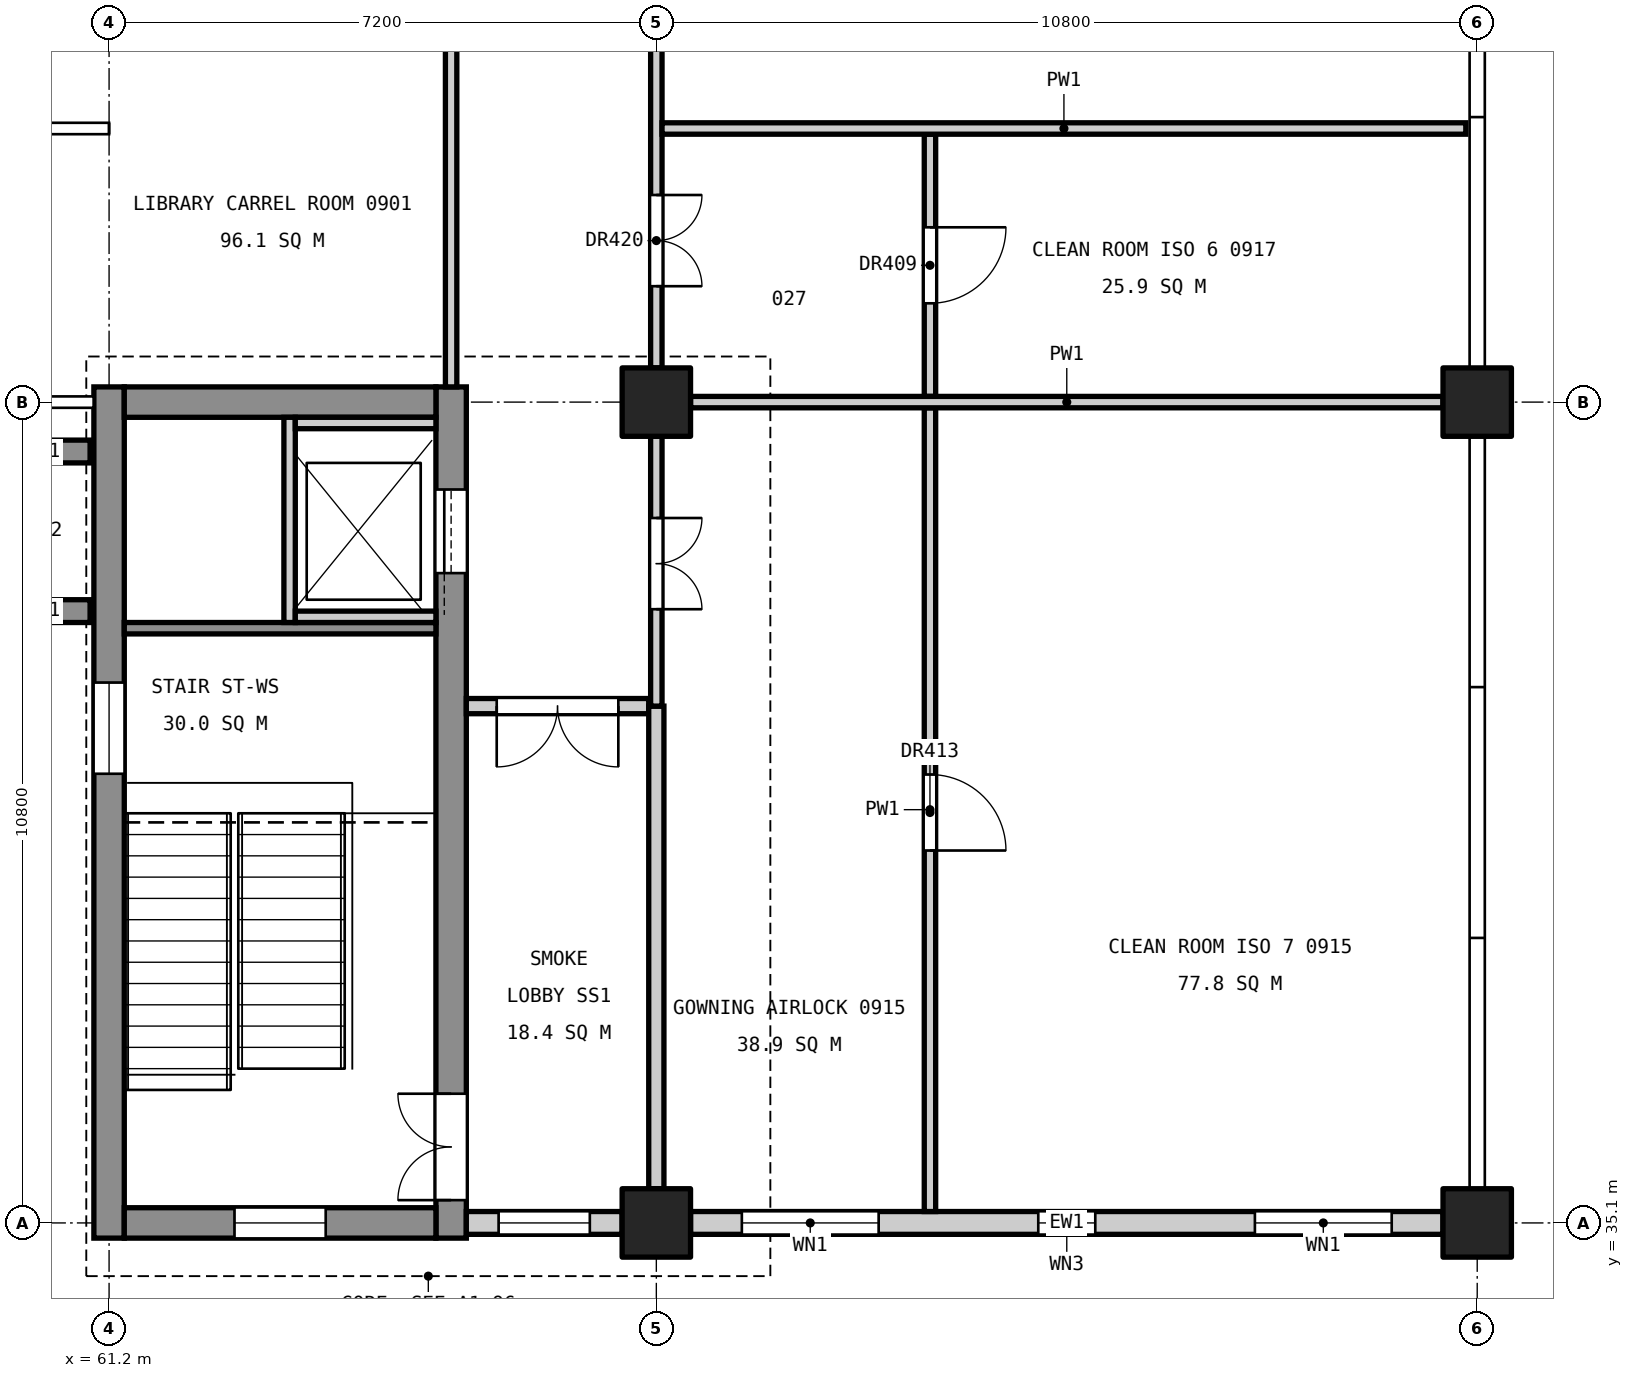
"""IFC4 building model, lengths in metres.
Left out: names, types, materials, properties, quantities, classifications, styles, units other than length and angle.
Written with IfcOpenShell. Run it as: python <this file> out.ifc"""

import sys

from ifc_helpers import new_model, si_unit, direction, frame, frame_2d, origin, origin_2d, place, context, subcontext, project, spatial, rectangle, extrude, element, fill, save


model = new_model("IFC4")
c1 = context("Model", 3, precision=1e-05, world=origin(), true_north=direction((0.0, 1.0)))
c2 = subcontext(c1, "Body", "Model", "MODEL_VIEW")
j1 = project(units=[si_unit("LENGTHUNIT", "METRE"), si_unit("PLANEANGLEUNIT", "RADIAN")], contexts=[c1])
p1 = place(None, origin())
s1 = spatial("IfcSite", under=j1, at=p1, CompositionType="ELEMENT")
p2 = place(p1, origin())
s2 = spatial("IfcBuilding", under=s1, at=p2, CompositionType="ELEMENT")
p3 = place(p2, frame((0.0, 0.0, 46.2)))
s3 = spatial("IfcBuildingStorey", under=s2, at=p3, CompositionType="ELEMENT", Elevation=46.2)
for number, where, z_axis, x_axis in (
    (1, (68.4, 35.1, 0.0), (0.0, 0.0, 1.0), (1.0, 0.0, 0.0)),
    (2, (68.4, 45.9, 0.0), (0.0, 0.0, 1.0), (1.0, 0.0, 0.0)),
    (3, (79.2, 35.1, 0.0), (0.0, 0.0, 1.0), (1.0, 0.0, 0.0)),
    (4, (79.2, 45.9, 0.0), (0.0, 0.0, 1.0), (1.0, 0.0, 0.0)),
):
    element("IfcColumn", number, at=place(p3, frame(where, z_axis=z_axis, x_axis=x_axis)), inside=s3, PredefinedType="COLUMN", context=c2, shape_type="SweptSolid", body=[
        extrude(rectangle(XDim=0.9, YDim=0.9, at=origin_2d()), origin(), (0.0, 0.0, 1.0), 4.8),
    ])
p4 = place(p3, frame((61.2, 34.9, 0.0), z_axis=(0.0, 0.0, 1.0), x_axis=(0.0, 1.0, 0.0)))
e5 = element("IfcWall", 5, at=p4, inside=s3, PredefinedType="SHEAR", context=c2, shape_type="SweptSolid", body=[
    extrude(rectangle(XDim=11.2, YDim=0.4, at=frame_2d((5.6, 0.0))), origin(), (0.0, 0.0, 1.0), 4.55),
])
p5 = place(p4, frame((6.11, 0.0, 3.4)))
e6 = element("IfcOpeningElement", 6, at=p5, cuts=e5, PredefinedType="OPENING", context=c2, shape_type="SweptSolid", body=[
    extrude(rectangle(XDim=1.2, YDim=0.9, at=frame_2d((0.6, 0.45))), frame((0.0, 0.21, 0.0), z_axis=(0.0, -1.0, 0.0), x_axis=(1.0, 0.0, 0.0)), (0.0, 0.0, 1.0), 0.42),
])
p6 = place(p3, frame((65.7, 34.9, 0.0), z_axis=(0.0, 0.0, 1.0), x_axis=(0.0, 1.0, 0.0)))
e7 = element("IfcWall", 7, at=p6, inside=s3, PredefinedType="SHEAR", context=c2, shape_type="SweptSolid", body=[
    extrude(rectangle(XDim=11.2, YDim=0.4, at=frame_2d((5.6, 0.0))), origin(), (0.0, 0.0, 1.0), 4.55),
])
p7 = place(p6, frame((0.5, 0.0, 0.0)))
e8 = element("IfcOpeningElement", 8, at=p7, cuts=e7, PredefinedType="OPENING", context=c2, shape_type="SweptSolid", body=[
    extrude(rectangle(XDim=1.4, YDim=2.1, at=frame_2d((0.7, 1.05))), frame((0.0, 0.21, 0.0), z_axis=(0.0, -1.0, 0.0), x_axis=(1.0, 0.0, 0.0)), (0.0, 0.0, 1.0), 0.42),
])
p8 = place(p6, frame((8.75, 0.0, 0.0)))
e9 = element("IfcOpeningElement", 9, at=p8, cuts=e7, PredefinedType="OPENING", context=c2, shape_type="SweptSolid", body=[
    extrude(rectangle(XDim=1.1, YDim=2.1, at=frame_2d((0.55, 1.05))), frame((0.0, 0.21, 0.0), z_axis=(0.0, -1.0, 0.0), x_axis=(1.0, 0.0, 0.0)), (0.0, 0.0, 1.0), 0.42),
])
p9 = place(p3, frame((61.4, 35.1, 0.0), z_axis=(0.0, 0.0, 1.0), x_axis=(1.0, 0.0, 0.0)))
e10 = element("IfcWall", 10, at=p9, inside=s3, PredefinedType="SHEAR", context=c2, shape_type="SweptSolid", body=[
    extrude(rectangle(XDim=4.1, YDim=0.4, at=frame_2d((2.05, 0.0))), origin(), (0.0, 0.0, 1.0), 4.55),
])
p10 = place(p9, frame((1.45, 0.0, 3.4)))
e11 = element("IfcOpeningElement", 11, at=p10, cuts=e10, PredefinedType="OPENING", context=c2, shape_type="SweptSolid", body=[
    extrude(rectangle(XDim=1.2, YDim=0.9, at=frame_2d((0.6, 0.45))), frame((0.0, 0.21, 0.0), z_axis=(0.0, -1.0, 0.0), x_axis=(1.0, 0.0, 0.0)), (0.0, 0.0, 1.0), 0.42),
])
p11 = place(p3, frame((61.4, 45.9, 0.0), z_axis=(0.0, 0.0, 1.0), x_axis=(1.0, 0.0, 0.0)))
e12 = element("IfcWall", 12, at=p11, inside=s3, PredefinedType="SHEAR", context=c2, shape_type="SweptSolid", body=[
    extrude(rectangle(XDim=4.1, YDim=0.4, at=frame_2d((2.05, 0.0))), origin(), (0.0, 0.0, 1.0), 4.55),
])
for number, where, z_axis, x_axis in (
    (13, (60.95, 43.15, 0.0), (0.0, 0.0, 1.0), (-1.0, 0.0, 0.0)),
    (14, (60.95, 45.25, 0.0), (0.0, 0.0, 1.0), (-1.0, 0.0, 0.0)),
):
    element("IfcWall", number, at=place(p3, frame(where, z_axis=z_axis, x_axis=x_axis)), inside=s3, PredefinedType="SHEAR", context=c2, shape_type="SweptSolid", body=[
        extrude(rectangle(XDim=1.25, YDim=0.3, at=frame_2d((0.625, 0.0))), origin(), (0.0, 0.0, 1.0), 4.8),
    ])
p12 = place(p3, frame((61.4, 42.925, 0.0), z_axis=(0.0, 0.0, 1.0), x_axis=(1.0, 0.0, 0.0)))
e15 = element("IfcWall", 15, at=p12, inside=s3, PredefinedType="SOLIDWALL", context=c2, shape_type="SweptSolid", body=[
    extrude(rectangle(XDim=4.1, YDim=0.15, at=frame_2d((2.05, 0.0))), origin(), (0.0, 0.0, 1.0), 4.55),
])
p13 = place(p3, frame((63.575, 43.0, 0.0), z_axis=(0.0, 0.0, 1.0), x_axis=(0.0, 1.0, 0.0)))
e16 = element("IfcWall", 16, at=p13, inside=s3, PredefinedType="SOLIDWALL", context=c2, shape_type="SweptSolid", body=[
    extrude(rectangle(XDim=2.7, YDim=0.15, at=frame_2d((1.35, 0.0))), origin(), (0.0, 0.0, 1.0), 4.8),
])
for number, where, z_axis, x_axis in (
    (17, (63.65, 43.075, 0.0), (0.0, 0.0, 1.0), (1.0, 0.0, 0.0)),
    (18, (63.65, 45.625, 0.0), (0.0, 0.0, 1.0), (1.0, 0.0, 0.0)),
):
    element("IfcWall", number, at=place(p3, frame(where, z_axis=z_axis, x_axis=x_axis)), inside=s3, PredefinedType="SOLIDWALL", context=c2, shape_type="SweptSolid", body=[
        extrude(rectangle(XDim=1.85, YDim=0.15, at=frame_2d((0.925, 0.0))), origin(), (0.0, 0.0, 1.0), 4.8),
    ])
p14 = place(p3, frame((65.9, 35.1, 0.0), z_axis=(0.0, 0.0, 1.0), x_axis=(1.0, 0.0, 0.0)))
e19 = element("IfcWall", 19, at=p14, inside=s3, PredefinedType="STANDARD", context=c2, shape_type="SweptSolid", body=[
    extrude(rectangle(XDim=2.05, YDim=0.3, at=frame_2d((1.025, 0.0))), origin(), (0.0, 0.0, 1.0), 3.85),
])
p15 = place(p14, frame((0.425, 0.0, 0.9)))
e20 = element("IfcOpeningElement", 20, at=p15, cuts=e19, PredefinedType="OPENING", context=c2, shape_type="SweptSolid", body=[
    extrude(rectangle(XDim=1.2, YDim=2.4, at=frame_2d((0.6, 1.2))), frame((0.0, 0.16, 0.0), z_axis=(0.0, -1.0, 0.0), x_axis=(1.0, 0.0, 0.0)), (0.0, 0.0, 1.0), 0.32),
])
p16 = place(p3, frame((68.85, 35.1, 0.0), z_axis=(0.0, 0.0, 1.0), x_axis=(1.0, 0.0, 0.0)))
e21 = element("IfcWall", 21, at=p16, inside=s3, PredefinedType="STANDARD", context=c2, shape_type="SweptSolid", body=[
    extrude(rectangle(XDim=9.9, YDim=0.3, at=frame_2d((4.95, 0.0))), origin(), (0.0, 0.0, 1.0), 3.85),
])
p17 = place(p16, frame((0.675, 0.0, 0.9)))
e22 = element("IfcOpeningElement", 22, at=p17, cuts=e21, PredefinedType="OPENING", context=c2, shape_type="SweptSolid", body=[
    extrude(rectangle(XDim=1.8, YDim=2.4, at=frame_2d((0.9, 1.2))), frame((0.0, 0.16, 0.0), z_axis=(0.0, -1.0, 0.0), x_axis=(1.0, 0.0, 0.0)), (0.0, 0.0, 1.0), 0.32),
])
p18 = place(p16, frame((4.575, 0.0, 0.8)))
e23 = element("IfcOpeningElement", 23, at=p18, cuts=e21, PredefinedType="OPENING", context=c2, shape_type="SweptSolid", body=[
    extrude(rectangle(XDim=0.75, YDim=1.2, at=frame_2d((0.375, 0.6))), frame((0.0, 0.16, 0.0), z_axis=(0.0, -1.0, 0.0), x_axis=(1.0, 0.0, 0.0)), (0.0, 0.0, 1.0), 0.32),
])
p19 = place(p16, frame((7.425, 0.0, 0.9)))
e24 = element("IfcOpeningElement", 24, at=p19, cuts=e21, PredefinedType="OPENING", context=c2, shape_type="SweptSolid", body=[
    extrude(rectangle(XDim=1.8, YDim=2.4, at=frame_2d((0.9, 1.2))), frame((0.0, 0.16, 0.0), z_axis=(0.0, -1.0, 0.0), x_axis=(1.0, 0.0, 0.0)), (0.0, 0.0, 1.0), 0.32),
])
p20 = place(p3, frame((65.7, 46.1, 0.0), z_axis=(0.0, 0.0, 1.0), x_axis=(0.0, 1.0, 0.0)))
e25 = element("IfcWall", 25, at=p20, inside=s3, PredefinedType="PARTITIONING", context=c2, shape_type="SweptSolid", body=[
    extrude(rectangle(XDim=10.45, YDim=0.15, at=frame_2d((5.225, 0.0))), origin(), (0.0, 0.0, 1.0), 3.55),
])
p21 = place(p20, frame((4.7, 0.0, 0.0)))
e26 = element("IfcOpeningElement", 26, at=p21, cuts=e25, PredefinedType="OPENING", context=c2, shape_type="SweptSolid", body=[
    extrude(rectangle(XDim=1.0, YDim=2.1, at=frame_2d((0.5, 1.05))), frame((0.0, 0.085, 0.0), z_axis=(0.0, -1.0, 0.0), x_axis=(1.0, 0.0, 0.0)), (0.0, 0.0, 1.0), 0.17),
])
p22 = place(p3, frame((65.9, 41.9, 0.0), z_axis=(0.0, 0.0, 1.0), x_axis=(1.0, 0.0, 0.0)))
e27 = element("IfcWall", 27, at=p22, inside=s3, PredefinedType="PARTITIONING", context=c2, shape_type="SweptSolid", body=[
    extrude(rectangle(XDim=2.4, YDim=0.2, at=frame_2d((1.2, 0.0))), origin(), (0.0, 0.0, 1.0), 3.55),
])
p23 = place(p22, frame((0.4, 0.0, 0.0)))
e28 = element("IfcOpeningElement", 28, at=p23, cuts=e27, PredefinedType="OPENING", context=c2, shape_type="SweptSolid", body=[
    extrude(rectangle(XDim=1.6, YDim=2.1, at=frame_2d((0.8, 1.05))), frame((0.0, 0.11, 0.0), z_axis=(0.0, -1.0, 0.0), x_axis=(1.0, 0.0, 0.0)), (0.0, 0.0, 1.0), 0.22),
])
p24 = place(p3, frame((68.4, 35.55, 0.0), z_axis=(0.0, 0.0, 1.0), x_axis=(0.0, 1.0, 0.0)))
e29 = element("IfcWall", 29, at=p24, inside=s3, PredefinedType="PARTITIONING", context=c2, shape_type="SweptSolid", body=[
    extrude(rectangle(XDim=6.35, YDim=0.2, at=frame_2d((3.175, 0.0))), origin(), (0.0, 0.0, 1.0), 3.55),
])
p25 = place(p3, frame((68.4, 41.9, 0.0), z_axis=(0.0, 0.0, 1.0), x_axis=(0.0, 1.0, 0.0)))
e30 = element("IfcWall", 30, at=p25, inside=s3, PredefinedType="PARTITIONING", context=c2, shape_type="SweptSolid", body=[
    extrude(rectangle(XDim=3.55, YDim=0.15, at=frame_2d((1.775, 0.0))), origin(), (0.0, 0.0, 1.0), 3.55),
])
p26 = place(p25, frame((1.275, 0.0, 0.0)))
e31 = element("IfcOpeningElement", 31, at=p26, cuts=e30, PredefinedType="OPENING", context=c2, shape_type="SweptSolid", body=[
    extrude(rectangle(XDim=1.2, YDim=2.1, at=frame_2d((0.6, 1.05))), frame((0.0, 0.085, 0.0), z_axis=(0.0, -1.0, 0.0), x_axis=(1.0, 0.0, 0.0)), (0.0, 0.0, 1.0), 0.17),
])
p27 = place(p3, frame((68.4, 46.35, 0.0), z_axis=(0.0, 0.0, 1.0), x_axis=(0.0, 1.0, 0.0)))
e32 = element("IfcWall", 32, at=p27, inside=s3, PredefinedType="PARTITIONING", context=c2, shape_type="SweptSolid", body=[
    extrude(rectangle(XDim=9.9, YDim=0.15, at=frame_2d((4.95, 0.0))), origin(), (0.0, 0.0, 1.0), 3.55),
])
p28 = place(p27, frame((1.075, 0.0, 0.0)))
e33 = element("IfcOpeningElement", 33, at=p28, cuts=e32, PredefinedType="OPENING", context=c2, shape_type="SweptSolid", body=[
    extrude(rectangle(XDim=1.2, YDim=2.1, at=frame_2d((0.6, 1.05))), frame((0.0, 0.085, 0.0), z_axis=(0.0, -1.0, 0.0), x_axis=(1.0, 0.0, 0.0)), (0.0, 0.0, 1.0), 0.17),
])
p29 = place(p27, frame((7.825, 0.0, 0.0)))
e34 = element("IfcOpeningElement", 34, at=p29, cuts=e32, PredefinedType="OPENING", context=c2, shape_type="SweptSolid", body=[
    extrude(rectangle(XDim=1.2, YDim=2.1, at=frame_2d((0.6, 1.05))), frame((0.0, 0.085, 0.0), z_axis=(0.0, -1.0, 0.0), x_axis=(1.0, 0.0, 0.0)), (0.0, 0.0, 1.0), 0.17),
])
p30 = place(p27, frame((4.35, 0.0, 0.0)))
e35 = element("IfcOpeningElement", 35, at=p30, cuts=e32, PredefinedType="OPENING", context=c2, shape_type="SweptSolid", body=[
    extrude(rectangle(XDim=1.2, YDim=2.1, at=frame_2d((0.6, 1.05))), frame((0.0, 0.085, 0.0), z_axis=(0.0, -1.0, 0.0), x_axis=(1.0, 0.0, 0.0)), (0.0, 0.0, 1.0), 0.17),
])
p31 = place(p3, frame((72.0, 35.25, 0.0), z_axis=(0.0, 0.0, 1.0), x_axis=(0.0, 1.0, 0.0)))
e36 = element("IfcWall", 36, at=p31, inside=s3, PredefinedType="PARTITIONING", context=c2, shape_type="SweptSolid", body=[
    extrude(rectangle(XDim=10.575, YDim=0.15, at=frame_2d((5.288, 0.0))), origin(), (0.0, 0.0, 1.0), 3.55),
])
p32 = place(p31, frame((4.75, 0.0, 0.0)))
e37 = element("IfcOpeningElement", 37, at=p32, cuts=e36, PredefinedType="OPENING", context=c2, shape_type="SweptSolid", body=[
    extrude(rectangle(XDim=1.0, YDim=2.1, at=frame_2d((0.5, 1.05))), frame((0.0, 0.085, 0.0), z_axis=(0.0, -1.0, 0.0), x_axis=(1.0, 0.0, 0.0)), (0.0, 0.0, 1.0), 0.17),
])
p33 = place(p3, frame((72.0, 45.975, 0.0), z_axis=(0.0, 0.0, 1.0), x_axis=(0.0, 1.0, 0.0)))
e38 = element("IfcWall", 38, at=p33, inside=s3, PredefinedType="PARTITIONING", context=c2, shape_type="SweptSolid", body=[
    extrude(rectangle(XDim=3.45, YDim=0.15, at=frame_2d((1.725, 0.0))), origin(), (0.0, 0.0, 1.0), 3.55),
])
p34 = place(p33, frame((1.225, 0.0, 0.0)))
e39 = element("IfcOpeningElement", 39, at=p34, cuts=e38, PredefinedType="OPENING", context=c2, shape_type="SweptSolid", body=[
    extrude(rectangle(XDim=1.0, YDim=2.1, at=frame_2d((0.5, 1.05))), frame((0.0, 0.085, 0.0), z_axis=(0.0, -1.0, 0.0), x_axis=(1.0, 0.0, 0.0)), (0.0, 0.0, 1.0), 0.17),
])
p35 = place(p3, frame((68.85, 45.9, 0.0), z_axis=(0.0, 0.0, 1.0), x_axis=(1.0, 0.0, 0.0)))
e40 = element("IfcWall", 40, at=p35, inside=s3, PredefinedType="PARTITIONING", context=c2, shape_type="SweptSolid", body=[
    extrude(rectangle(XDim=9.9, YDim=0.15, at=frame_2d((4.95, 0.0))), origin(), (0.0, 0.0, 1.0), 3.85),
])
p36 = place(p3, frame((68.475, 49.5, 0.0), z_axis=(0.0, 0.0, 1.0), x_axis=(1.0, 0.0, 0.0)))
e41 = element("IfcWall", 41, at=p36, inside=s3, PredefinedType="PARTITIONING", context=c2, shape_type="SweptSolid", body=[
    extrude(rectangle(XDim=10.575, YDim=0.15, at=frame_2d((5.288, 0.0))), origin(), (0.0, 0.0, 1.0), 3.85),
])
p37 = place(p7, origin())
e42 = element("IfcDoor", 42, at=p37, inside=s3, OperationType="DOUBLE_DOOR_SINGLE_SWING", PredefinedType="DOOR", context=c2, shape_type="SweptSolid", body=[
    extrude(rectangle(XDim=1.4, YDim=2.1, at=frame_2d((0.7, 1.05))), frame((0.0, 0.025, 0.0), z_axis=(0.0, -1.0, 0.0), x_axis=(1.0, 0.0, 0.0)), (0.0, 0.0, 1.0), 0.05),
])
fill(e8, e42)
p38 = place(p8, origin())
e43 = element("IfcDoor", 43, at=p38, inside=s3, OperationType="SLIDING_TO_LEFT", PredefinedType="DOOR", context=c2, shape_type="SweptSolid", body=[
    extrude(rectangle(XDim=1.1, YDim=2.1, at=frame_2d((0.55, 1.05))), frame((0.0, 0.025, 0.0), z_axis=(0.0, -1.0, 0.0), x_axis=(1.0, 0.0, 0.0)), (0.0, 0.0, 1.0), 0.05),
])
fill(e9, e43)
p39 = place(p15, origin())
e44 = element("IfcWindow", 44, at=p39, inside=s3, PartitioningType="SINGLE_PANEL", PredefinedType="WINDOW", context=c2, shape_type="SweptSolid", body=[
    extrude(rectangle(XDim=1.2, YDim=2.4, at=frame_2d((0.6, 1.2))), frame((0.0, 0.03, 0.0), z_axis=(0.0, -1.0, 0.0), x_axis=(1.0, 0.0, 0.0)), (0.0, 0.0, 1.0), 0.06),
])
fill(e20, e44)
p40 = place(p17, origin())
e45 = element("IfcWindow", 45, at=p40, inside=s3, PartitioningType="SINGLE_PANEL", PredefinedType="WINDOW", context=c2, shape_type="SweptSolid", body=[
    extrude(rectangle(XDim=1.8, YDim=2.4, at=frame_2d((0.9, 1.2))), frame((0.0, 0.03, 0.0), z_axis=(0.0, -1.0, 0.0), x_axis=(1.0, 0.0, 0.0)), (0.0, 0.0, 1.0), 0.06),
])
fill(e22, e45)
p41 = place(p18, origin())
e46 = element("IfcWindow", 46, at=p41, inside=s3, PartitioningType="SINGLE_PANEL", PredefinedType="WINDOW", context=c2, shape_type="SweptSolid", body=[
    extrude(rectangle(XDim=0.75, YDim=1.2, at=frame_2d((0.375, 0.6))), frame((0.0, 0.03, 0.0), z_axis=(0.0, -1.0, 0.0), x_axis=(1.0, 0.0, 0.0)), (0.0, 0.0, 1.0), 0.06),
])
fill(e23, e46)
p42 = place(p19, origin())
e47 = element("IfcWindow", 47, at=p42, inside=s3, PartitioningType="SINGLE_PANEL", PredefinedType="WINDOW", context=c2, shape_type="SweptSolid", body=[
    extrude(rectangle(XDim=1.8, YDim=2.4, at=frame_2d((0.9, 1.2))), frame((0.0, 0.03, 0.0), z_axis=(0.0, -1.0, 0.0), x_axis=(1.0, 0.0, 0.0)), (0.0, 0.0, 1.0), 0.06),
])
fill(e24, e47)
p43 = place(p5, origin())
e48 = element("IfcWindow", 48, at=p43, inside=s3, PartitioningType="SINGLE_PANEL", PredefinedType="WINDOW", context=c2, shape_type="SweptSolid", body=[
    extrude(rectangle(XDim=1.2, YDim=0.9, at=frame_2d((0.6, 0.45))), frame((0.0, 0.03, 0.0), z_axis=(0.0, -1.0, 0.0), x_axis=(1.0, 0.0, 0.0)), (0.0, 0.0, 1.0), 0.06),
])
fill(e6, e48)
p44 = place(p10, origin())
e49 = element("IfcWindow", 49, at=p44, inside=s3, PartitioningType="SINGLE_PANEL", PredefinedType="WINDOW", context=c2, shape_type="SweptSolid", body=[
    extrude(rectangle(XDim=1.2, YDim=0.9, at=frame_2d((0.6, 0.45))), frame((0.0, 0.03, 0.0), z_axis=(0.0, -1.0, 0.0), x_axis=(1.0, 0.0, 0.0)), (0.0, 0.0, 1.0), 0.06),
])
fill(e11, e49)
p45 = place(p34, frame((1.0, 0.0, 0.0), z_axis=(0.0, 0.0, 1.0), x_axis=(-1.0, 0.0, 0.0)))
e50 = element("IfcDoor", 50, at=p45, inside=s3, OperationType="SINGLE_SWING_LEFT", PredefinedType="DOOR", context=c2, shape_type="SweptSolid", body=[
    extrude(rectangle(XDim=1.0, YDim=2.1, at=frame_2d((0.5, 1.05))), frame((0.0, 0.025, 0.0), z_axis=(0.0, -1.0, 0.0), x_axis=(1.0, 0.0, 0.0)), (0.0, 0.0, 1.0), 0.05),
])
fill(e39, e50)
p46 = place(p32, frame((1.0, 0.0, 0.0), z_axis=(0.0, 0.0, 1.0), x_axis=(-1.0, 0.0, 0.0)))
e51 = element("IfcDoor", 51, at=p46, inside=s3, OperationType="SINGLE_SWING_RIGHT", PredefinedType="DOOR", context=c2, shape_type="SweptSolid", body=[
    extrude(rectangle(XDim=1.0, YDim=2.1, at=frame_2d((0.5, 1.05))), frame((0.0, 0.025, 0.0), z_axis=(0.0, -1.0, 0.0), x_axis=(1.0, 0.0, 0.0)), (0.0, 0.0, 1.0), 0.05),
])
fill(e37, e51)
p47 = place(p26, frame((1.2, 0.0, 0.0), z_axis=(0.0, 0.0, 1.0), x_axis=(-1.0, 0.0, 0.0)))
e52 = element("IfcDoor", 52, at=p47, inside=s3, OperationType="DOUBLE_DOOR_SINGLE_SWING", PredefinedType="DOOR", context=c2, shape_type="SweptSolid", body=[
    extrude(rectangle(XDim=1.2, YDim=2.1, at=frame_2d((0.6, 1.05))), frame((0.0, 0.025, 0.0), z_axis=(0.0, -1.0, 0.0), x_axis=(1.0, 0.0, 0.0)), (0.0, 0.0, 1.0), 0.05),
])
fill(e31, e52)
p48 = place(p28, frame((1.2, 0.0, 0.0), z_axis=(0.0, 0.0, 1.0), x_axis=(-1.0, 0.0, 0.0)))
e53 = element("IfcDoor", 53, at=p48, inside=s3, OperationType="DOUBLE_DOOR_SINGLE_SWING", PredefinedType="DOOR", context=c2, shape_type="SweptSolid", body=[
    extrude(rectangle(XDim=1.2, YDim=2.1, at=frame_2d((0.6, 1.05))), frame((0.0, 0.025, 0.0), z_axis=(0.0, -1.0, 0.0), x_axis=(1.0, 0.0, 0.0)), (0.0, 0.0, 1.0), 0.05),
])
fill(e33, e53)
p49 = place(p23, frame((1.6, 0.0, 0.0), z_axis=(0.0, 0.0, 1.0), x_axis=(-1.0, 0.0, 0.0)))
e54 = element("IfcDoor", 54, at=p49, inside=s3, OperationType="DOUBLE_DOOR_SINGLE_SWING", PredefinedType="DOOR", context=c2, shape_type="SweptSolid", body=[
    extrude(rectangle(XDim=1.6, YDim=2.1, at=frame_2d((0.8, 1.05))), frame((0.0, 0.025, 0.0), z_axis=(0.0, -1.0, 0.0), x_axis=(1.0, 0.0, 0.0)), (0.0, 0.0, 1.0), 0.05),
])
fill(e28, e54)
save(model, sys.argv[1])
